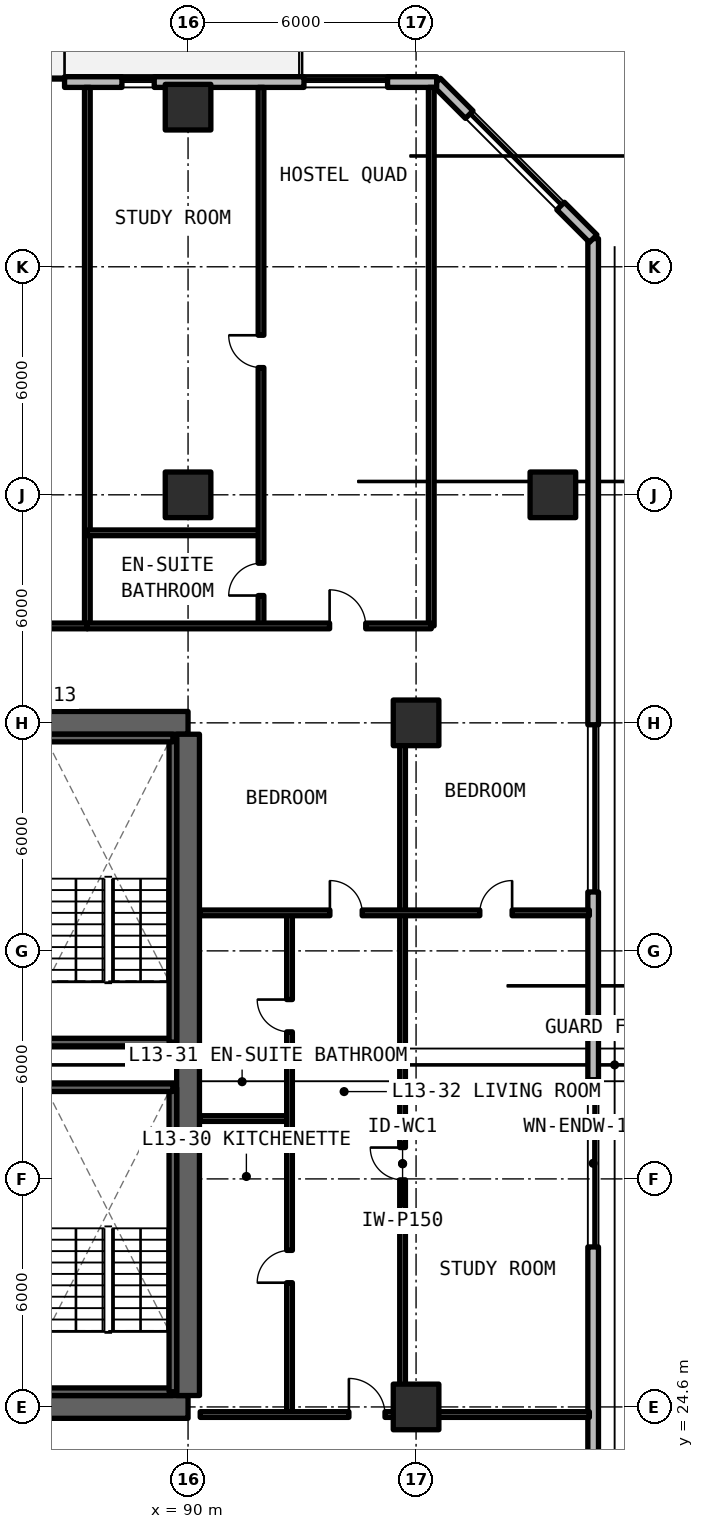
"""IFC4 building model, lengths in metres.
Left out: names, types, materials, properties, quantities, classifications, styles, units other than length and angle.
Written with IfcOpenShell. Run it as: python <this file> out.ifc"""

import sys

from ifc_helpers import new_model, si_unit, direction, frame, frame_2d, origin, origin_2d, place, context, subcontext, project, spatial, rectangle, extrude, element, fill, save


model = new_model("IFC4")
c1 = context("Model", 3, precision=1e-05, world=origin(), true_north=direction((0.0, 1.0)))
c2 = subcontext(c1, "Body", "Model", "MODEL_VIEW")
j1 = project(units=[si_unit("LENGTHUNIT", "METRE"), si_unit("PLANEANGLEUNIT", "RADIAN")], contexts=[c1])
p1 = place(None, origin())
s1 = spatial("IfcSite", under=j1, at=p1, CompositionType="ELEMENT")
p2 = place(p1, origin())
s2 = spatial("IfcBuilding", under=s1, at=p2, CompositionType="ELEMENT")
p3 = place(p2, frame((0.0, 0.0, 48.84)))
s3 = spatial("IfcBuildingStorey", under=s2, at=p3, CompositionType="ELEMENT", Elevation=48.84)
for number, where, z_axis, x_axis in (
    (1, (78.0, 24.6, 0.0), (0.0, 0.0, 1.0), (1.0, 0.0, 0.0)),
    (2, (90.0, 42.6, 0.0), (0.0, 0.0, 1.0), (-1.0, 0.0, 0.0)),
):
    element("IfcWall", number, at=place(p3, frame(where, z_axis=z_axis, x_axis=x_axis)), inside=s3, PredefinedType="SHEAR", context=c2, shape_type="SweptSolid", body=[
        extrude(rectangle(XDim=12.0, YDim=0.6, at=frame_2d((6.0, 0.0))), origin(), (0.0, 0.0, 1.0), 3.3),
    ])
p4 = place(p3, frame((90.0, 24.9, 0.0), z_axis=(0.0, 0.0, 1.0), x_axis=(0.0, 1.0, 0.0)))
e3 = element("IfcWall", 3, at=p4, inside=s3, PredefinedType="SHEAR", context=c2, shape_type="SweptSolid", body=[
    extrude(rectangle(XDim=17.4, YDim=0.6, at=frame_2d((8.7, 0.0))), origin(), (0.0, 0.0, 1.0), 3.3),
])
for number, where, z_axis, x_axis in (
    (4, (96.0, 24.6, 0.0), (0.0, 0.0, 1.0), (1.0, 0.0, 0.0)),
    (5, (96.0, 42.6, 0.0), (0.0, 0.0, 1.0), (1.0, 0.0, 0.0)),
    (6, (90.0, 48.6, 0.0), (0.0, 0.0, 1.0), (1.0, 0.0, 0.0)),
    (7, (99.6, 48.6, 0.0), (0.0, 0.0, 1.0), (1.0, 0.0, 0.0)),
    (8, (90.0, 58.8, 0.0), (0.0, 0.0, 1.0), (1.0, 0.0, 0.0)),
):
    element("IfcColumn", number, at=place(p3, frame(where, z_axis=z_axis, x_axis=x_axis)), inside=s3, PredefinedType="COLUMN", context=c2, shape_type="SweptSolid", body=[
        extrude(rectangle(XDim=1.2, YDim=1.2, at=origin_2d()), origin(), (0.0, 0.0, 1.0), 3.3),
    ])
p5 = place(p3, frame((100.66, 11.858, 0.0), z_axis=(0.0, 0.0, 1.0), x_axis=(0.0, 1.0, 0.0)))
e9 = element("IfcWall", 9, at=p5, inside=s3, PredefinedType="SOLIDWALL", context=c2, shape_type="SweptSolid", body=[
    extrude(rectangle(XDim=43.484, YDim=0.28, at=frame_2d((21.742, 0.0))), origin(), (0.0, 0.0, 1.0), 3.08),
])
p6 = place(p5, frame((16.952, 0.0, 0.78)))
e10 = element("IfcOpeningElement", 10, at=p6, cuts=e9, PredefinedType="OPENING", context=c2, shape_type="SweptSolid", body=[
    extrude(rectangle(XDim=4.4, YDim=1.66, at=frame_2d((2.2, 0.83))), frame((0.0, 0.15, 0.0), z_axis=(0.0, -1.0, 0.0), x_axis=(1.0, 0.0, 0.0)), (0.0, 0.0, 1.0), 0.3),
])
p7 = place(p5, frame((26.292, 0.0, 0.78)))
e11 = element("IfcOpeningElement", 11, at=p7, cuts=e9, PredefinedType="OPENING", context=c2, shape_type="SweptSolid", body=[
    extrude(rectangle(XDim=4.4, YDim=1.66, at=frame_2d((2.2, 0.83))), frame((0.0, 0.15, 0.0), z_axis=(0.0, -1.0, 0.0), x_axis=(1.0, 0.0, 0.0)), (0.0, 0.0, 1.0), 0.3),
])
p8 = place(p5, frame((1.511, 0.0, 0.78)))
e12 = element("IfcOpeningElement", 12, at=p8, cuts=e9, PredefinedType="OPENING", context=c2, shape_type="SweptSolid", body=[
    extrude(rectangle(XDim=4.4, YDim=1.66, at=frame_2d((2.2, 0.83))), frame((0.0, 0.15, 0.0), z_axis=(0.0, -1.0, 0.0), x_axis=(1.0, 0.0, 0.0)), (0.0, 0.0, 1.0), 0.3),
])
p9 = place(p3, frame((100.66, 55.342, 0.0), z_axis=(0.0, 0.0, 1.0), x_axis=(-0.707106781187, 0.707106781187, 0.0)))
e13 = element("IfcWall", 13, at=p9, inside=s3, PredefinedType="SOLIDWALL", context=c2, shape_type="SweptSolid", body=[
    extrude(rectangle(XDim=5.824, YDim=0.28, at=frame_2d((2.912, 0.0))), origin(), (0.0, 0.0, 1.0), 3.08),
])
p10 = place(p9, frame((1.212, 0.0, 0.78)))
e14 = element("IfcOpeningElement", 14, at=p10, cuts=e13, PredefinedType="OPENING", context=c2, shape_type="SweptSolid", body=[
    extrude(rectangle(XDim=3.4, YDim=1.66, at=frame_2d((1.7, 0.83))), frame((0.0, 0.15, 0.0), z_axis=(0.0, -1.0, 0.0), x_axis=(1.0, 0.0, 0.0)), (0.0, 0.0, 1.0), 0.3),
])
p11 = place(p3, frame((96.542, 59.46, 0.0), z_axis=(0.0, 0.0, 1.0), x_axis=(-1.0, 0.0, 0.0)))
e15 = element("IfcWall", 15, at=p11, inside=s3, PredefinedType="SOLIDWALL", context=c2, shape_type="SweptSolid", body=[
    extrude(rectangle(XDim=44.402, YDim=0.28, at=frame_2d((22.201, 0.0))), origin(), (0.0, 0.0, 1.0), 3.08),
])
p12 = place(p11, frame((32.292, 0.0, 0.0)))
e16 = element("IfcOpeningElement", 16, at=p12, cuts=e15, PredefinedType="OPENING", context=c2, shape_type="SweptSolid", body=[
    extrude(rectangle(XDim=1.1, YDim=2.15, at=frame_2d((0.55, 1.075))), frame((0.0, 0.15, 0.0), z_axis=(0.0, -1.0, 0.0), x_axis=(1.0, 0.0, 0.0)), (0.0, 0.0, 1.0), 0.3),
])
p13 = place(p11, frame((21.692, 0.0, 0.0)))
e17 = element("IfcOpeningElement", 17, at=p13, cuts=e15, PredefinedType="OPENING", context=c2, shape_type="SweptSolid", body=[
    extrude(rectangle(XDim=1.1, YDim=2.15, at=frame_2d((0.55, 1.075))), frame((0.0, 0.15, 0.0), z_axis=(0.0, -1.0, 0.0), x_axis=(1.0, 0.0, 0.0)), (0.0, 0.0, 1.0), 0.3),
])
p14 = place(p11, frame((9.792, 0.0, 0.0)))
e18 = element("IfcOpeningElement", 18, at=p14, cuts=e15, PredefinedType="OPENING", context=c2, shape_type="SweptSolid", body=[
    extrude(rectangle(XDim=1.1, YDim=2.15, at=frame_2d((0.55, 1.075))), frame((0.0, 0.15, 0.0), z_axis=(0.0, -1.0, 0.0), x_axis=(1.0, 0.0, 0.0)), (0.0, 0.0, 1.0), 0.3),
])
p15 = place(p11, frame((39.455, 0.0, 0.78)))
e19 = element("IfcOpeningElement", 19, at=p15, cuts=e15, PredefinedType="OPENING", context=c2, shape_type="SweptSolid", body=[
    extrude(rectangle(XDim=2.2, YDim=1.66, at=frame_2d((1.1, 0.83))), frame((0.0, 0.15, 0.0), z_axis=(0.0, -1.0, 0.0), x_axis=(1.0, 0.0, 0.0)), (0.0, 0.0, 1.0), 0.3),
])
p16 = place(p11, frame((7.432, 0.0, 0.78)))
e20 = element("IfcOpeningElement", 20, at=p16, cuts=e15, PredefinedType="OPENING", context=c2, shape_type="SweptSolid", body=[
    extrude(rectangle(XDim=0.85, YDim=1.65, at=frame_2d((0.425, 0.825))), frame((0.0, 0.15, 0.0), z_axis=(0.0, -1.0, 0.0), x_axis=(1.0, 0.0, 0.0)), (0.0, 0.0, 1.0), 0.3),
])
p17 = place(p11, frame((1.292, 0.0, 0.78)))
e21 = element("IfcOpeningElement", 21, at=p17, cuts=e15, PredefinedType="OPENING", context=c2, shape_type="SweptSolid", body=[
    extrude(rectangle(XDim=2.2, YDim=1.66, at=frame_2d((1.1, 0.83))), frame((0.0, 0.15, 0.0), z_axis=(0.0, -1.0, 0.0), x_axis=(1.0, 0.0, 0.0)), (0.0, 0.0, 1.0), 0.3),
])
p18 = place(p3, frame((95.645, 24.4, 0.0), z_axis=(0.0, 0.0, 1.0), x_axis=(0.0, 1.0, 0.0)))
e22 = element("IfcWall", 22, at=p18, inside=s3, PredefinedType="PARTITIONING", context=c2, shape_type="SweptSolid", body=[
    extrude(rectangle(XDim=13.2, YDim=0.15, at=frame_2d((6.6, 0.0))), origin(), (0.0, 0.0, 1.0), 2.35),
])
p19 = place(p18, frame((6.175, 0.0, 0.0)))
e23 = element("IfcOpeningElement", 23, at=p19, cuts=e22, PredefinedType="OPENING", context=c2, shape_type="SweptSolid", body=[
    extrude(rectangle(XDim=0.85, YDim=2.1, at=frame_2d((0.425, 1.05))), frame((0.0, 0.085, 0.0), z_axis=(0.0, -1.0, 0.0), x_axis=(1.0, 0.0, 0.0)), (0.0, 0.0, 1.0), 0.17),
])
p20 = place(p3, frame((90.32, 32.188, 0.0), z_axis=(0.0, 0.0, 1.0), x_axis=(1.0, 0.0, 0.0)))
e24 = element("IfcWall", 24, at=p20, inside=s3, PredefinedType="PARTITIONING", context=c2, shape_type="SweptSolid", body=[
    extrude(rectangle(XDim=2.35, YDim=0.15, at=frame_2d((1.175, 0.0))), origin(), (0.0, 0.0, 1.0), 2.35),
])
p21 = place(p3, frame((92.67, 24.4, 0.0), z_axis=(0.0, 0.0, 1.0), x_axis=(0.0, 1.0, 0.0)))
e25 = element("IfcWall", 25, at=p21, inside=s3, PredefinedType="PARTITIONING", context=c2, shape_type="SweptSolid", body=[
    extrude(rectangle(XDim=13.2, YDim=0.15, at=frame_2d((6.6, 0.0))), origin(), (0.0, 0.0, 1.0), 2.35),
])
p22 = place(p21, frame((3.469, 0.0, 0.0)))
e26 = element("IfcOpeningElement", 26, at=p22, cuts=e25, PredefinedType="OPENING", context=c2, shape_type="SweptSolid", body=[
    extrude(rectangle(XDim=0.85, YDim=2.1, at=frame_2d((0.425, 1.05))), frame((0.0, 0.085, 0.0), z_axis=(0.0, -1.0, 0.0), x_axis=(1.0, 0.0, 0.0)), (0.0, 0.0, 1.0), 0.17),
])
p23 = place(p21, frame((10.069, 0.0, 0.0)))
e27 = element("IfcOpeningElement", 27, at=p23, cuts=e25, PredefinedType="OPENING", context=c2, shape_type="SweptSolid", body=[
    extrude(rectangle(XDim=0.85, YDim=2.1, at=frame_2d((0.425, 1.05))), frame((0.0, 0.085, 0.0), z_axis=(0.0, -1.0, 0.0), x_axis=(1.0, 0.0, 0.0)), (0.0, 0.0, 1.0), 0.17),
])
p24 = place(p3, frame((95.645, 37.6, 0.0), z_axis=(0.0, 0.0, 1.0), x_axis=(0.0, 1.0, 0.0)))
e28 = element("IfcWall", 28, at=p24, inside=s3, PredefinedType="PARTITIONING", context=c2, shape_type="SweptSolid", body=[
    extrude(rectangle(XDim=5.2, YDim=0.15, at=frame_2d((2.6, 0.0))), origin(), (0.0, 0.0, 1.0), 2.35),
])
p25 = place(p3, frame((90.32, 37.6, 0.0), z_axis=(0.0, 0.0, 1.0), x_axis=(1.0, 0.0, 0.0)))
e29 = element("IfcWall", 29, at=p25, inside=s3, PredefinedType="PARTITIONING", context=c2, shape_type="SweptSolid", body=[
    extrude(rectangle(XDim=10.24, YDim=0.15, at=frame_2d((5.12, 0.0))), origin(), (0.0, 0.0, 1.0), 2.35),
])
p26 = place(p25, frame((3.412, 0.0, 0.0)))
e30 = element("IfcOpeningElement", 30, at=p26, cuts=e29, PredefinedType="OPENING", context=c2, shape_type="SweptSolid", body=[
    extrude(rectangle(XDim=0.85, YDim=2.1, at=frame_2d((0.425, 1.05))), frame((0.0, 0.085, 0.0), z_axis=(0.0, -1.0, 0.0), x_axis=(1.0, 0.0, 0.0)), (0.0, 0.0, 1.0), 0.17),
])
p27 = place(p25, frame((7.357, 0.0, 0.0)))
e31 = element("IfcOpeningElement", 31, at=p27, cuts=e29, PredefinedType="OPENING", context=c2, shape_type="SweptSolid", body=[
    extrude(rectangle(XDim=0.85, YDim=2.1, at=frame_2d((0.425, 1.05))), frame((0.0, 0.085, 0.0), z_axis=(0.0, -1.0, 0.0), x_axis=(1.0, 0.0, 0.0)), (0.0, 0.0, 1.0), 0.17),
])
p28 = place(p3, frame((90.32, 24.4, 0.0), z_axis=(0.0, 0.0, 1.0), x_axis=(1.0, 0.0, 0.0)))
e32 = element("IfcWall", 32, at=p28, inside=s3, PredefinedType="SOLIDWALL", context=c2, shape_type="SweptSolid", body=[
    extrude(rectangle(XDim=10.24, YDim=0.15, at=frame_2d((5.12, 0.0))), origin(), (0.0, 0.0, 1.0), 2.295),
])
p29 = place(p28, frame((3.913, 0.0, 0.0)))
e33 = element("IfcOpeningElement", 33, at=p29, cuts=e32, PredefinedType="OPENING", context=c2, shape_type="SweptSolid", body=[
    extrude(rectangle(XDim=0.95, YDim=2.15, at=frame_2d((0.475, 1.075))), frame((0.0, 0.085, 0.0), z_axis=(0.0, -1.0, 0.0), x_axis=(1.0, 0.0, 0.0)), (0.0, 0.0, 1.0), 0.17),
])
for number, where, z_axis, x_axis in (
    (34, (96.4, 45.15, 0.0), (0.0, 0.0, 1.0), (0.0, 1.0, 0.0)),
    (35, (87.35, 45.15, 0.0), (0.0, 0.0, 1.0), (0.0, 1.0, 0.0)),
):
    element("IfcWall", number, at=place(p3, frame(where, z_axis=z_axis, x_axis=x_axis)), inside=s3, PredefinedType="SOLIDWALL", context=c2, shape_type="SweptSolid", body=[
        extrude(rectangle(XDim=14.17, YDim=0.15, at=frame_2d((7.085, 0.0))), origin(), (0.0, 0.0, 1.0), 2.35),
    ])
p30 = place(p3, frame((75.391, 45.15, 0.0), z_axis=(0.0, 0.0, 1.0), x_axis=(1.0, 0.0, 0.0)))
e36 = element("IfcWall", 36, at=p30, inside=s3, PredefinedType="SOLIDWALL", context=c2, shape_type="SweptSolid", body=[
    extrude(rectangle(XDim=11.959, YDim=0.15, at=frame_2d((5.979, 0.0))), origin(), (0.0, 0.0, 1.0), 2.35),
])
p31 = place(p30, frame((5.429, 0.0, 0.0)))
e37 = element("IfcOpeningElement", 37, at=p31, cuts=e36, PredefinedType="OPENING", context=c2, shape_type="SweptSolid", body=[
    extrude(rectangle(XDim=1.1, YDim=2.15, at=frame_2d((0.55, 1.075))), frame((0.0, 0.085, 0.0), z_axis=(0.0, -1.0, 0.0), x_axis=(1.0, 0.0, 0.0)), (0.0, 0.0, 1.0), 0.17),
])
p32 = place(p3, frame((87.35, 47.6, 0.0), z_axis=(0.0, 0.0, 1.0), x_axis=(1.0, 0.0, 0.0)))
e38 = element("IfcWall", 38, at=p32, inside=s3, PredefinedType="PARTITIONING", context=c2, shape_type="SweptSolid", body=[
    extrude(rectangle(XDim=4.57, YDim=0.15, at=frame_2d((2.285, 0.0))), origin(), (0.0, 0.0, 1.0), 2.35),
])
p33 = place(p3, frame((91.92, 45.15, 0.0), z_axis=(0.0, 0.0, 1.0), x_axis=(0.0, 1.0, 0.0)))
e39 = element("IfcWall", 39, at=p33, inside=s3, PredefinedType="PARTITIONING", context=c2, shape_type="SweptSolid", body=[
    extrude(rectangle(XDim=14.17, YDim=0.15, at=frame_2d((7.085, 0.0))), origin(), (0.0, 0.0, 1.0), 2.35),
])
p34 = place(p33, frame((0.8, 0.0, 0.0)))
e40 = element("IfcOpeningElement", 40, at=p34, cuts=e39, PredefinedType="OPENING", context=c2, shape_type="SweptSolid", body=[
    extrude(rectangle(XDim=0.85, YDim=2.1, at=frame_2d((0.425, 1.05))), frame((0.0, 0.085, 0.0), z_axis=(0.0, -1.0, 0.0), x_axis=(1.0, 0.0, 0.0)), (0.0, 0.0, 1.0), 0.17),
])
p35 = place(p33, frame((6.798, 0.0, 0.0)))
e41 = element("IfcOpeningElement", 41, at=p35, cuts=e39, PredefinedType="OPENING", context=c2, shape_type="SweptSolid", body=[
    extrude(rectangle(XDim=0.85, YDim=2.1, at=frame_2d((0.425, 1.05))), frame((0.0, 0.085, 0.0), z_axis=(0.0, -1.0, 0.0), x_axis=(1.0, 0.0, 0.0)), (0.0, 0.0, 1.0), 0.17),
])
p36 = place(p3, frame((87.35, 45.15, 0.0), z_axis=(0.0, 0.0, 1.0), x_axis=(1.0, 0.0, 0.0)))
e42 = element("IfcWall", 42, at=p36, inside=s3, PredefinedType="SOLIDWALL", context=c2, shape_type="SweptSolid", body=[
    extrude(rectangle(XDim=9.05, YDim=0.15, at=frame_2d((4.525, 0.0))), origin(), (0.0, 0.0, 1.0), 2.35),
])
p37 = place(p36, frame((6.375, 0.0, 0.0)))
e43 = element("IfcOpeningElement", 43, at=p37, cuts=e42, PredefinedType="OPENING", context=c2, shape_type="SweptSolid", body=[
    extrude(rectangle(XDim=0.95, YDim=2.15, at=frame_2d((0.475, 1.075))), frame((0.0, 0.085, 0.0), z_axis=(0.0, -1.0, 0.0), x_axis=(1.0, 0.0, 0.0)), (0.0, 0.0, 1.0), 0.17),
])
p38 = place(p3, frame((86.2, 25.0, 0.0), z_axis=(0.0, 0.0, 1.0), x_axis=(1.0, 0.0, 0.0)))
e44 = element("IfcWall", 44, at=p38, inside=s3, PredefinedType="SOLIDWALL", context=c2, shape_type="SweptSolid", body=[
    extrude(rectangle(XDim=3.4, YDim=0.2, at=frame_2d((1.7, 0.0))), origin(), (0.0, 0.0, 1.0), 3.3),
])
p39 = place(p3, frame((89.6, 25.0, 0.0), z_axis=(0.0, 0.0, 1.0), x_axis=(0.0, 1.0, 0.0)))
e45 = element("IfcWall", 45, at=p39, inside=s3, PredefinedType="SOLIDWALL", context=c2, shape_type="SweptSolid", body=[
    extrude(rectangle(XDim=8.0, YDim=0.2, at=frame_2d((4.0, 0.0))), origin(), (0.0, 0.0, 1.0), 3.3),
])
for number, where, z_axis, x_axis in (
    (46, (89.6, 33.0, 0.0), (0.0, 0.0, 1.0), (-1.0, 0.0, 0.0)),
    (47, (86.2, 34.2, 0.0), (0.0, 0.0, 1.0), (1.0, 0.0, 0.0)),
):
    element("IfcWall", number, at=place(p3, frame(where, z_axis=z_axis, x_axis=x_axis)), inside=s3, PredefinedType="SOLIDWALL", context=c2, shape_type="SweptSolid", body=[
        extrude(rectangle(XDim=3.4, YDim=0.2, at=frame_2d((1.7, 0.0))), origin(), (0.0, 0.0, 1.0), 3.3),
    ])
p40 = place(p3, frame((89.6, 34.2, 0.0), z_axis=(0.0, 0.0, 1.0), x_axis=(0.0, 1.0, 0.0)))
e48 = element("IfcWall", 48, at=p40, inside=s3, PredefinedType="SOLIDWALL", context=c2, shape_type="SweptSolid", body=[
    extrude(rectangle(XDim=8.0, YDim=0.2, at=frame_2d((4.0, 0.0))), origin(), (0.0, 0.0, 1.0), 3.3),
])
p41 = place(p3, frame((89.6, 42.2, 0.0), z_axis=(0.0, 0.0, 1.0), x_axis=(-1.0, 0.0, 0.0)))
e49 = element("IfcWall", 49, at=p41, inside=s3, PredefinedType="SOLIDWALL", context=c2, shape_type="SweptSolid", body=[
    extrude(rectangle(XDim=3.4, YDim=0.2, at=frame_2d((1.7, 0.0))), origin(), (0.0, 0.0, 1.0), 3.3),
])
p42 = place(p6, origin())
e50 = element("IfcWindow", 50, at=p42, inside=s3, PartitioningType="SINGLE_PANEL", PredefinedType="WINDOW", context=c2, shape_type="SweptSolid", body=[
    extrude(rectangle(XDim=4.4, YDim=1.66, at=frame_2d((2.2, 0.83))), frame((0.0, 0.03, 0.0), z_axis=(0.0, -1.0, 0.0), x_axis=(1.0, 0.0, 0.0)), (0.0, 0.0, 1.0), 0.06),
])
fill(e10, e50)
p43 = place(p7, origin())
e51 = element("IfcWindow", 51, at=p43, inside=s3, PartitioningType="SINGLE_PANEL", PredefinedType="WINDOW", context=c2, shape_type="SweptSolid", body=[
    extrude(rectangle(XDim=4.4, YDim=1.66, at=frame_2d((2.2, 0.83))), frame((0.0, 0.03, 0.0), z_axis=(0.0, -1.0, 0.0), x_axis=(1.0, 0.0, 0.0)), (0.0, 0.0, 1.0), 0.06),
])
fill(e11, e51)
p44 = place(p10, origin())
e52 = element("IfcWindow", 52, at=p44, inside=s3, PartitioningType="SINGLE_PANEL", PredefinedType="WINDOW", context=c2, shape_type="SweptSolid", body=[
    extrude(rectangle(XDim=3.4, YDim=1.66, at=frame_2d((1.7, 0.83))), frame((0.0, 0.03, 0.0), z_axis=(0.0, -1.0, 0.0), x_axis=(1.0, 0.0, 0.0)), (0.0, 0.0, 1.0), 0.06),
])
fill(e14, e52)
p45 = place(p14, frame((1.1, 0.0, 0.0), z_axis=(0.0, 0.0, 1.0), x_axis=(-1.0, 0.0, 0.0)))
e53 = element("IfcDoor", 53, at=p45, inside=s3, OperationType="SINGLE_SWING_RIGHT", PredefinedType="DOOR", context=c2, shape_type="SweptSolid", body=[
    extrude(rectangle(XDim=1.1, YDim=2.15, at=frame_2d((0.55, 1.075))), frame((0.0, 0.025, 0.0), z_axis=(0.0, -1.0, 0.0), x_axis=(1.0, 0.0, 0.0)), (0.0, 0.0, 1.0), 0.05),
])
fill(e18, e53)
p46 = place(p16, origin())
e54 = element("IfcWindow", 54, at=p46, inside=s3, PartitioningType="SINGLE_PANEL", PredefinedType="WINDOW", context=c2, shape_type="SweptSolid", body=[
    extrude(rectangle(XDim=0.85, YDim=1.65, at=frame_2d((0.425, 0.825))), frame((0.0, 0.03, 0.0), z_axis=(0.0, -1.0, 0.0), x_axis=(1.0, 0.0, 0.0)), (0.0, 0.0, 1.0), 0.06),
])
fill(e20, e54)
p47 = place(p17, origin())
e55 = element("IfcWindow", 55, at=p47, inside=s3, PartitioningType="SINGLE_PANEL", PredefinedType="WINDOW", context=c2, shape_type="SweptSolid", body=[
    extrude(rectangle(XDim=2.2, YDim=1.66, at=frame_2d((1.1, 0.83))), frame((0.0, 0.03, 0.0), z_axis=(0.0, -1.0, 0.0), x_axis=(1.0, 0.0, 0.0)), (0.0, 0.0, 1.0), 0.06),
])
fill(e21, e55)
p48 = place(p19, origin())
e56 = element("IfcDoor", 56, at=p48, inside=s3, OperationType="SINGLE_SWING_RIGHT", PredefinedType="DOOR", context=c2, shape_type="SweptSolid", body=[
    extrude(rectangle(XDim=0.85, YDim=2.1, at=frame_2d((0.425, 1.05))), frame((0.0, 0.025, 0.0), z_axis=(0.0, -1.0, 0.0), x_axis=(1.0, 0.0, 0.0)), (0.0, 0.0, 1.0), 0.05),
])
fill(e23, e56)
p49 = place(p22, origin())
e57 = element("IfcDoor", 57, at=p49, inside=s3, OperationType="SINGLE_SWING_LEFT", PredefinedType="DOOR", context=c2, shape_type="SweptSolid", body=[
    extrude(rectangle(XDim=0.85, YDim=2.1, at=frame_2d((0.425, 1.05))), frame((0.0, 0.025, 0.0), z_axis=(0.0, -1.0, 0.0), x_axis=(1.0, 0.0, 0.0)), (0.0, 0.0, 1.0), 0.05),
])
fill(e26, e57)
p50 = place(p23, origin())
e58 = element("IfcDoor", 58, at=p50, inside=s3, OperationType="SINGLE_SWING_RIGHT", PredefinedType="DOOR", context=c2, shape_type="SweptSolid", body=[
    extrude(rectangle(XDim=0.85, YDim=2.1, at=frame_2d((0.425, 1.05))), frame((0.0, 0.025, 0.0), z_axis=(0.0, -1.0, 0.0), x_axis=(1.0, 0.0, 0.0)), (0.0, 0.0, 1.0), 0.05),
])
fill(e27, e58)
p51 = place(p26, origin())
e59 = element("IfcDoor", 59, at=p51, inside=s3, OperationType="SINGLE_SWING_LEFT", PredefinedType="DOOR", context=c2, shape_type="SweptSolid", body=[
    extrude(rectangle(XDim=0.85, YDim=2.1, at=frame_2d((0.425, 1.05))), frame((0.0, 0.025, 0.0), z_axis=(0.0, -1.0, 0.0), x_axis=(1.0, 0.0, 0.0)), (0.0, 0.0, 1.0), 0.05),
])
fill(e30, e59)
p52 = place(p27, origin())
e60 = element("IfcDoor", 60, at=p52, inside=s3, OperationType="SINGLE_SWING_RIGHT", PredefinedType="DOOR", context=c2, shape_type="SweptSolid", body=[
    extrude(rectangle(XDim=0.85, YDim=2.1, at=frame_2d((0.425, 1.05))), frame((0.0, 0.025, 0.0), z_axis=(0.0, -1.0, 0.0), x_axis=(1.0, 0.0, 0.0)), (0.0, 0.0, 1.0), 0.05),
])
fill(e31, e60)
p53 = place(p29, origin())
e61 = element("IfcDoor", 61, at=p53, inside=s3, OperationType="SINGLE_SWING_LEFT", PredefinedType="DOOR", context=c2, shape_type="SweptSolid", body=[
    extrude(rectangle(XDim=0.95, YDim=2.15, at=frame_2d((0.475, 1.075))), frame((0.0, 0.025, 0.0), z_axis=(0.0, -1.0, 0.0), x_axis=(1.0, 0.0, 0.0)), (0.0, 0.0, 1.0), 0.05),
])
fill(e33, e61)
p54 = place(p34, origin())
e62 = element("IfcDoor", 62, at=p54, inside=s3, OperationType="SINGLE_SWING_LEFT", PredefinedType="DOOR", context=c2, shape_type="SweptSolid", body=[
    extrude(rectangle(XDim=0.85, YDim=2.1, at=frame_2d((0.425, 1.05))), frame((0.0, 0.025, 0.0), z_axis=(0.0, -1.0, 0.0), x_axis=(1.0, 0.0, 0.0)), (0.0, 0.0, 1.0), 0.05),
])
fill(e40, e62)
p55 = place(p35, origin())
e63 = element("IfcDoor", 63, at=p55, inside=s3, OperationType="SINGLE_SWING_RIGHT", PredefinedType="DOOR", context=c2, shape_type="SweptSolid", body=[
    extrude(rectangle(XDim=0.85, YDim=2.1, at=frame_2d((0.425, 1.05))), frame((0.0, 0.025, 0.0), z_axis=(0.0, -1.0, 0.0), x_axis=(1.0, 0.0, 0.0)), (0.0, 0.0, 1.0), 0.05),
])
fill(e41, e63)
p56 = place(p37, origin())
e64 = element("IfcDoor", 64, at=p56, inside=s3, OperationType="SINGLE_SWING_LEFT", PredefinedType="DOOR", context=c2, shape_type="SweptSolid", body=[
    extrude(rectangle(XDim=0.95, YDim=2.15, at=frame_2d((0.475, 1.075))), frame((0.0, 0.025, 0.0), z_axis=(0.0, -1.0, 0.0), x_axis=(1.0, 0.0, 0.0)), (0.0, 0.0, 1.0), 0.05),
])
fill(e43, e64)
save(model, sys.argv[1])
